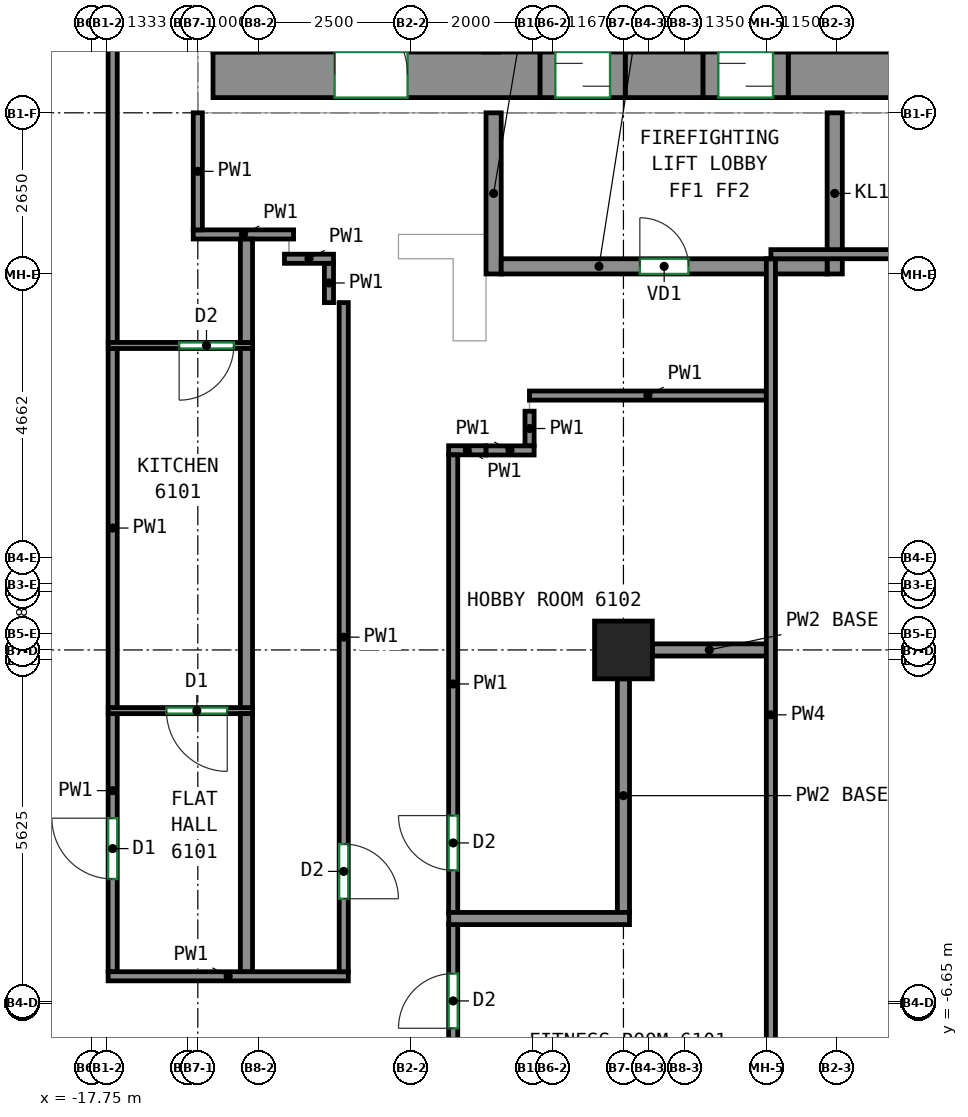
"""IFC4 building model, lengths in metres.
Left out: names, types, materials, properties, quantities, classifications, styles, units other than length and angle.
Written with IfcOpenShell. Run it as: python <this file> out.ifc"""

import sys

from ifc_helpers import new_model, si_unit, direction, frame, frame_2d, origin, origin_2d, place, context, subcontext, project, spatial, rectangle, extrude, source, transform, mapped, element, fill, save


model = new_model("IFC4")
c1 = context("Model", 3, precision=1e-05, world=origin(), true_north=direction((0.0, 1.0)))
c2 = subcontext(c1, "Body", "Model", "MODEL_VIEW")
j1 = project(units=[si_unit("LENGTHUNIT", "METRE"), si_unit("PLANEANGLEUNIT", "RADIAN")], contexts=[c1])
p1 = place(None, origin())
s1 = spatial("IfcSite", under=j1, at=p1, CompositionType="ELEMENT")
p2 = place(p1, origin())
s2 = spatial("IfcBuilding", under=s1, at=p2, CompositionType="ELEMENT")
p3 = place(p2, frame((0.0, 0.0, 252.6)))
s3 = spatial("IfcBuildingStorey", under=s2, at=p3, CompositionType="ELEMENT", Elevation=252.6)
m1 = source(origin(), c2, "Body", "SweptSolid", [
    extrude(rectangle(XDim=0.95, YDim=0.95, at=origin_2d()), origin(), (0.0, 0.0, 1.0), 3.12),
])
p4 = place(p3, frame((-9.0, -0.833, 0.0), z_axis=(0.0, 0.0, 1.0), x_axis=(1.0, 0.0, 0.0)))
e1 = element("IfcColumn", 1, at=p4, inside=s3, PredefinedType="COLUMN", context=c2, shape_type="MappedRepresentation", body=[
    mapped(m1, transform((0.0, 0.0, 0.0))),
])
m2 = source(origin(), c2, "Body", "SweptSolid", [
    extrude(rectangle(XDim=5.38, YDim=0.75, at=frame_2d((2.69, 0.0))), origin(), (0.0, 0.0, 1.0), 3.12),
])
p5 = place(p3, frame((-15.75, 8.625, 0.0), z_axis=(0.0, 0.0, 1.0), x_axis=(1.0, 0.0, 0.0)))
e2 = element("IfcWall", 2, at=p5, inside=s3, PredefinedType="SHEAR", context=c2, shape_type="MappedRepresentation", body=[
    mapped(m2, transform((0.0, 0.0, 0.0))),
])
p6 = place(p5, frame((2.0, 0.0, 0.0)))
e3 = element("IfcOpeningElement", 3, at=p6, cuts=e2, PredefinedType="OPENING", context=c2, shape_type="SweptSolid", body=[
    extrude(rectangle(XDim=1.2, YDim=2.1, at=frame_2d((0.6, 1.05))), frame((0.0, 0.385, 0.0), z_axis=(0.0, -1.0, 0.0), x_axis=(1.0, 0.0, 0.0)), (0.0, 0.0, 1.0), 0.77),
])
m3 = source(origin(), c2, "Body", "SweptSolid", [
    extrude(rectangle(XDim=1.28, YDim=0.75, at=frame_2d((0.64, 0.0))), origin(), (0.0, 0.0, 1.0), 3.12),
])
p7 = place(p3, frame((-8.97, 8.625, 0.0), z_axis=(0.0, 0.0, 1.0), x_axis=(1.0, 0.0, 0.0)))
e4 = element("IfcWall", 4, at=p7, inside=s3, PredefinedType="SHEAR", context=c2, shape_type="MappedRepresentation", body=[
    mapped(m3, transform((0.0, 0.0, 0.0))),
])
m4 = source(origin(), c2, "Body", "SweptSolid", [
    extrude(rectangle(XDim=14.18, YDim=0.75, at=frame_2d((7.09, 0.0))), origin(), (0.0, 0.0, 1.0), 3.12),
])
p8 = place(p3, frame((-6.29, 8.625, 0.0), z_axis=(0.0, 0.0, 1.0), x_axis=(1.0, 0.0, 0.0)))
e5 = element("IfcWall", 5, at=p8, inside=s3, PredefinedType="SHEAR", context=c2, shape_type="MappedRepresentation", body=[
    mapped(m4, transform((0.0, 0.0, 0.0))),
])
m5 = source(origin(), c2, "Body", "SweptSolid", [
    extrude(rectangle(XDim=2.65, YDim=0.25, at=frame_2d((1.325, 0.0))), origin(), (0.0, 0.0, 1.0), 2.57),
])
for number, where, z_axis, x_axis in (
    (6, (-11.135, 5.35, 0.0), (0.0, 0.0, 1.0), (0.0, 1.0, 0.0)),
    (7, (-5.525, 5.35, 0.0), (0.0, 0.0, 1.0), (0.0, 1.0, 0.0)),
):
    element("IfcWall", number, at=place(p3, frame(where, z_axis=z_axis, x_axis=x_axis)), inside=s3, PredefinedType="PARTITIONING", context=c2, shape_type="MappedRepresentation", body=[
        mapped(m5, transform((0.0, 0.0, 0.0))),
    ])
m6 = source(origin(), c2, "Body", "SweptSolid", [
    extrude(rectangle(XDim=5.36, YDim=0.25, at=frame_2d((2.68, 0.0))), origin(), (0.0, 0.0, 1.0), 3.12),
])
p9 = place(p3, frame((-11.01, 5.475, 0.0), z_axis=(0.0, 0.0, 1.0), x_axis=(1.0, 0.0, 0.0)))
e8 = element("IfcWall", 8, at=p9, inside=s3, PredefinedType="PARTITIONING", context=c2, shape_type="MappedRepresentation", body=[
    mapped(m6, transform((0.0, 0.0, 0.0))),
])
p10 = place(p9, frame((2.28, 0.0, 0.0)))
e9 = element("IfcOpeningElement", 9, at=p10, cuts=e8, PredefinedType="OPENING", context=c2, shape_type="SweptSolid", body=[
    extrude(rectangle(XDim=0.8, YDim=2.0, at=frame_2d((0.4, 1.0))), frame((0.0, 0.135, 0.0), z_axis=(0.0, -1.0, 0.0), x_axis=(1.0, 0.0, 0.0)), (0.0, 0.0, 1.0), 0.27),
])
m7 = source(origin(), c2, "Body", "SweptSolid", [
    extrude(rectangle(XDim=1.4, YDim=0.75, at=frame_2d((0.7, 0.0))), origin(), (0.0, 0.0, 1.0), 2.7),
])
p11 = place(p3, frame((-10.37, 8.625, 0.0), z_axis=(0.0, 0.0, 1.0), x_axis=(1.0, 0.0, 0.0)))
e10 = element("IfcWall", 10, at=p11, inside=s3, PredefinedType="PARTITIONING", context=c2, shape_type="MappedRepresentation", body=[
    mapped(m7, transform((0.0, 0.0, 0.0))),
])
p12 = place(p11, frame((0.25, 0.0, 0.0)))
e11 = element("IfcOpeningElement", 11, at=p12, cuts=e10, PredefinedType="OPENING", context=c2, shape_type="SweptSolid", body=[
    extrude(rectangle(XDim=0.9, YDim=2.1, at=frame_2d((0.45, 1.05))), frame((0.0, 0.385, 0.0), z_axis=(0.0, -1.0, 0.0), x_axis=(1.0, 0.0, 0.0)), (0.0, 0.0, 1.0), 0.77),
])
m8 = source(origin(), c2, "Body", "SweptSolid", [
    extrude(rectangle(XDim=1.4, YDim=0.75, at=frame_2d((0.7, 0.0))), origin(), (0.0, 0.0, 1.0), 2.7),
])
p13 = place(p3, frame((-7.69, 8.625, 0.0), z_axis=(0.0, 0.0, 1.0), x_axis=(1.0, 0.0, 0.0)))
e12 = element("IfcWall", 12, at=p13, inside=s3, PredefinedType="PARTITIONING", context=c2, shape_type="MappedRepresentation", body=[
    mapped(m8, transform((0.0, 0.0, 0.0))),
])
p14 = place(p13, frame((0.25, 0.0, 0.0)))
e13 = element("IfcOpeningElement", 13, at=p14, cuts=e12, PredefinedType="OPENING", context=c2, shape_type="SweptSolid", body=[
    extrude(rectangle(XDim=0.9, YDim=2.1, at=frame_2d((0.45, 1.05))), frame((0.0, 0.385, 0.0), z_axis=(0.0, -1.0, 0.0), x_axis=(1.0, 0.0, 0.0)), (0.0, 0.0, 1.0), 0.77),
])
p15 = place(p3, frame((-17.4, -6.125, 0.0), z_axis=(0.0, 0.0, 1.0), x_axis=(0.0, 1.0, 0.0)))
e14 = element("IfcWall", 14, at=p15, inside=s3, PredefinedType="PARTITIONING", context=c2, shape_type="SweptSolid", body=[
    extrude(rectangle(XDim=4.254, YDim=0.15, at=frame_2d((2.127, 0.0))), origin(), (0.0, 0.0, 1.0), 3.12),
])
p16 = place(p15, frame((1.525, 0.0, 0.0)))
e15 = element("IfcOpeningElement", 15, at=p16, cuts=e14, PredefinedType="OPENING", context=c2, shape_type="SweptSolid", body=[
    extrude(rectangle(XDim=1.0, YDim=2.1, at=frame_2d((0.5, 1.05))), frame((0.0, 0.085, 0.0), z_axis=(0.0, -1.0, 0.0), x_axis=(1.0, 0.0, 0.0)), (0.0, 0.0, 1.0), 0.17),
])
p17 = place(p3, frame((-17.475, -6.2, 0.0), z_axis=(0.0, 0.0, 1.0), x_axis=(1.0, 0.0, 0.0)))
e16 = element("IfcWall", 16, at=p17, inside=s3, PredefinedType="PARTITIONING", context=c2, shape_type="SweptSolid", body=[
    extrude(rectangle(XDim=3.95, YDim=0.15, at=frame_2d((1.975, 0.0))), origin(), (0.0, 0.0, 1.0), 3.12),
])
p18 = place(p3, frame((-17.4, -1.791, 0.0), z_axis=(0.0, 0.0, 1.0), x_axis=(0.0, 1.0, 0.0)))
e17 = element("IfcWall", 17, at=p18, inside=s3, PredefinedType="PARTITIONING", context=c2, shape_type="SweptSolid", body=[
    extrude(rectangle(XDim=5.925, YDim=0.15, at=frame_2d((2.962, 0.0))), origin(), (0.0, 0.0, 1.0), 3.12),
])
p19 = place(p3, frame((-17.4, 4.214, 0.0), z_axis=(0.0, 0.0, 1.0), x_axis=(0.0, 1.0, 0.0)))
e18 = element("IfcWall", 18, at=p19, inside=s3, PredefinedType="PARTITIONING", context=c2, shape_type="SweptSolid", body=[
    extrude(rectangle(XDim=12.477, YDim=0.15, at=frame_2d((6.238, 0.0))), origin(), (0.0, 0.0, 1.0), 3.12),
])
p20 = place(p3, frame((-16.075, 6.0, 0.0), z_axis=(0.0, 0.0, 1.0), x_axis=(1.0, 0.0, 0.0)))
e19 = element("IfcWall", 19, at=p20, inside=s3, PredefinedType="PARTITIONING", context=c2, shape_type="SweptSolid", body=[
    extrude(rectangle(XDim=1.65, YDim=0.15, at=frame_2d((0.825, 0.0))), origin(), (0.0, 0.0, 1.0), 3.12),
])
p21 = place(p3, frame((-16.0, 6.075, 0.0), z_axis=(0.0, 0.0, 1.0), x_axis=(0.0, 1.0, 0.0)))
e20 = element("IfcWall", 20, at=p21, inside=s3, PredefinedType="PARTITIONING", context=c2, shape_type="SweptSolid", body=[
    extrude(rectangle(XDim=1.925, YDim=0.15, at=frame_2d((0.962, 0.0))), origin(), (0.0, 0.0, 1.0), 3.12),
])
p22 = place(p3, frame((-13.6, 4.879, 0.0), z_axis=(0.0, 0.0, 1.0), x_axis=(0.0, -1.0, 0.0)))
e21 = element("IfcWall", 21, at=p22, inside=s3, PredefinedType="PARTITIONING", context=c2, shape_type="SweptSolid", body=[
    extrude(rectangle(XDim=11.004, YDim=0.15, at=frame_2d((5.502, 0.0))), origin(), (0.0, 0.0, 1.0), 3.12),
])
p23 = place(p22, frame((8.904, 0.0, 0.0)))
e22 = element("IfcOpeningElement", 22, at=p23, cuts=e21, PredefinedType="OPENING", context=c2, shape_type="SweptSolid", body=[
    extrude(rectangle(XDim=0.9, YDim=2.1, at=frame_2d((0.45, 1.05))), frame((0.0, 0.085, 0.0), z_axis=(0.0, -1.0, 0.0), x_axis=(1.0, 0.0, 0.0)), (0.0, 0.0, 1.0), 0.17),
])
p24 = place(p3, frame((-13.843, 5.525, 0.0), z_axis=(0.0, 0.0, 1.0), x_axis=(0.0, -1.0, 0.0)))
e23 = element("IfcWall", 23, at=p24, inside=s3, PredefinedType="PARTITIONING", context=c2, shape_type="SweptSolid", body=[
    extrude(rectangle(XDim=0.646, YDim=0.15, at=frame_2d((0.323, 0.0))), origin(), (0.0, 0.0, 1.0), 3.12),
])
p25 = place(p3, frame((-14.575, 5.6, 0.0), z_axis=(0.0, 0.0, 1.0), x_axis=(1.0, 0.0, 0.0)))
e24 = element("IfcWall", 24, at=p25, inside=s3, PredefinedType="PARTITIONING", context=c2, shape_type="SweptSolid", body=[
    extrude(rectangle(XDim=0.807, YDim=0.15, at=frame_2d((0.403, 0.0))), origin(), (0.0, 0.0, 1.0), 3.12),
])
p26 = place(p3, frame((-10.546, 3.35, 0.0), z_axis=(0.0, 0.0, 1.0), x_axis=(1.0, 0.0, 0.0)))
e25 = element("IfcWall", 25, at=p26, inside=s3, PredefinedType="PARTITIONING", context=c2, shape_type="SweptSolid", body=[
    extrude(rectangle(XDim=3.896, YDim=0.15, at=frame_2d((1.948, 0.0))), origin(), (0.0, 0.0, 1.0), 3.12),
])
p27 = place(p3, frame((-10.544, 2.523, 0.0), z_axis=(0.0, 0.0, 1.0), x_axis=(0.0, 1.0, 0.0)))
e26 = element("IfcWall", 26, at=p27, inside=s3, PredefinedType="PARTITIONING", context=c2, shape_type="SweptSolid", body=[
    extrude(rectangle(XDim=0.57, YDim=0.15, at=frame_2d((0.285, 0.0))), origin(), (0.0, 0.0, 1.0), 3.12),
])
p28 = place(p3, frame((-11.262, 2.448, 0.0), z_axis=(0.0, 0.0, 1.0), x_axis=(1.0, 0.0, 0.0)))
e27 = element("IfcWall", 27, at=p28, inside=s3, PredefinedType="PARTITIONING", context=c2, shape_type="SweptSolid", body=[
    extrude(rectangle(XDim=0.793, YDim=0.15, at=frame_2d((0.396, 0.0))), origin(), (0.0, 0.0, 1.0), 3.12),
])
p29 = place(p3, frame((-11.875, 2.45, 0.0), z_axis=(0.0, 0.0, 1.0), x_axis=(1.0, 0.0, 0.0)))
e28 = element("IfcWall", 28, at=p29, inside=s3, PredefinedType="PARTITIONING", context=c2, shape_type="SweptSolid", body=[
    extrude(rectangle(XDim=0.613, YDim=0.15, at=frame_2d((0.307, 0.0))), origin(), (0.0, 0.0, 1.0), 3.12),
])
p30 = place(p3, frame((-11.8, -5.16, 0.0), z_axis=(0.0, 0.0, 1.0), x_axis=(0.0, 1.0, 0.0)))
e29 = element("IfcWall", 29, at=p30, inside=s3, PredefinedType="PARTITIONING", context=c2, shape_type="SweptSolid", body=[
    extrude(rectangle(XDim=7.535, YDim=0.15, at=frame_2d((3.768, 0.0))), origin(), (0.0, 0.0, 1.0), 3.12),
])
p31 = place(p30, frame((0.703, 0.0, 0.0)))
e30 = element("IfcOpeningElement", 30, at=p31, cuts=e29, PredefinedType="OPENING", context=c2, shape_type="SweptSolid", body=[
    extrude(rectangle(XDim=0.9, YDim=2.1, at=frame_2d((0.45, 1.05))), frame((0.0, 0.085, 0.0), z_axis=(0.0, -1.0, 0.0), x_axis=(1.0, 0.0, 0.0)), (0.0, 0.0, 1.0), 0.17),
])
p32 = place(p3, frame((-11.8, -10.125, 0.0), z_axis=(0.0, 0.0, 1.0), x_axis=(0.0, 1.0, 0.0)))
e31 = element("IfcWall", 31, at=p32, inside=s3, PredefinedType="PARTITIONING", context=c2, shape_type="SweptSolid", body=[
    extrude(rectangle(XDim=4.785, YDim=0.15, at=frame_2d((2.393, 0.0))), origin(), (0.0, 0.0, 1.0), 3.12),
])
p33 = place(p32, frame((3.07, 0.0, 0.0)))
e32 = element("IfcOpeningElement", 32, at=p33, cuts=e31, PredefinedType="OPENING", context=c2, shape_type="SweptSolid", body=[
    extrude(rectangle(XDim=0.9, YDim=2.1, at=frame_2d((0.45, 1.05))), frame((0.0, 0.085, 0.0), z_axis=(0.0, -1.0, 0.0), x_axis=(1.0, 0.0, 0.0)), (0.0, 0.0, 1.0), 0.17),
])
p34 = place(p3, frame((-15.1, -1.831, 0.0), z_axis=(0.0, 0.0, 1.0), x_axis=(-1.0, 0.0, 0.0)))
e33 = element("IfcWall", 33, at=p34, inside=s3, PredefinedType="PARTITIONING", context=c2, shape_type="SweptSolid", body=[
    extrude(rectangle(XDim=2.373, YDim=0.1, at=frame_2d((1.187, 0.0))), origin(), (0.0, 0.0, 1.0), 3.12),
])
p35 = place(p34, frame((0.416, 0.0, 0.0)))
e34 = element("IfcOpeningElement", 34, at=p35, cuts=e33, PredefinedType="OPENING", context=c2, shape_type="SweptSolid", body=[
    extrude(rectangle(XDim=1.0, YDim=2.1, at=frame_2d((0.5, 1.05))), frame((0.0, 0.06, 0.0), z_axis=(0.0, -1.0, 0.0), x_axis=(1.0, 0.0, 0.0)), (0.0, 0.0, 1.0), 0.12),
])
p36 = place(p3, frame((-15.2, -6.123, 0.0), z_axis=(0.0, 0.0, 1.0), x_axis=(0.0, 1.0, 0.0)))
e35 = element("IfcWall", 35, at=p36, inside=s3, PredefinedType="PARTITIONING", context=c2, shape_type="SweptSolid", body=[
    extrude(rectangle(XDim=4.242, YDim=0.2, at=frame_2d((2.121, 0.0))), origin(), (0.0, 0.0, 1.0), 3.12),
])
p37 = place(p3, frame((-15.1, 4.174, 0.0), z_axis=(0.0, 0.0, 1.0), x_axis=(-1.0, 0.0, 0.0)))
e36 = element("IfcWall", 36, at=p37, inside=s3, PredefinedType="PARTITIONING", context=c2, shape_type="SweptSolid", body=[
    extrude(rectangle(XDim=2.373, YDim=0.1, at=frame_2d((1.187, 0.0))), origin(), (0.0, 0.0, 1.0), 3.12),
])
p38 = place(p37, frame((0.307, 0.0, 0.0)))
e37 = element("IfcOpeningElement", 37, at=p38, cuts=e36, PredefinedType="OPENING", context=c2, shape_type="SweptSolid", body=[
    extrude(rectangle(XDim=0.9, YDim=2.1, at=frame_2d((0.45, 1.05))), frame((0.0, 0.06, 0.0), z_axis=(0.0, -1.0, 0.0), x_axis=(1.0, 0.0, 0.0)), (0.0, 0.0, 1.0), 0.12),
])
p39 = place(p3, frame((-15.2, -1.781, 0.0), z_axis=(0.0, 0.0, 1.0), x_axis=(0.0, 1.0, 0.0)))
e38 = element("IfcWall", 38, at=p39, inside=s3, PredefinedType="PARTITIONING", context=c2, shape_type="SweptSolid", body=[
    extrude(rectangle(XDim=5.905, YDim=0.2, at=frame_2d((2.953, 0.0))), origin(), (0.0, 0.0, 1.0), 3.12),
])
p40 = place(p3, frame((-15.2, 4.224, 0.0), z_axis=(0.0, 0.0, 1.0), x_axis=(0.0, 1.0, 0.0)))
e39 = element("IfcWall", 39, at=p40, inside=s3, PredefinedType="PARTITIONING", context=c2, shape_type="SweptSolid", body=[
    extrude(rectangle(XDim=1.699, YDim=0.2, at=frame_2d((0.85, 0.0))), origin(), (0.0, 0.0, 1.0), 3.12),
])
p41 = place(p3, frame((-8.525, -0.833, 0.0), z_axis=(0.0, 0.0, 1.0), x_axis=(1.0, 0.0, 0.0)))
e40 = element("IfcWall", 40, at=p41, inside=s3, PredefinedType="PARTITIONING", context=c2, shape_type="SweptSolid", body=[
    extrude(rectangle(XDim=1.875, YDim=0.2, at=frame_2d((0.938, 0.0))), origin(), (0.0, 0.0, 1.0), 2.57),
])
p42 = place(p3, frame((-9.0, -5.15, 0.0), z_axis=(0.0, 0.0, 1.0), x_axis=(0.0, 1.0, 0.0)))
e41 = element("IfcWall", 41, at=p42, inside=s3, PredefinedType="PARTITIONING", context=c2, shape_type="SweptSolid", body=[
    extrude(rectangle(XDim=3.842, YDim=0.2, at=frame_2d((1.921, 0.0))), origin(), (0.0, 0.0, 1.0), 2.57),
])
p43 = place(p3, frame((-11.873, -5.25, 0.0), z_axis=(0.0, 0.0, 1.0), x_axis=(1.0, 0.0, 0.0)))
e42 = element("IfcWall", 42, at=p43, inside=s3, PredefinedType="PARTITIONING", context=c2, shape_type="SweptSolid", body=[
    extrude(rectangle(XDim=2.973, YDim=0.2, at=frame_2d((1.487, 0.0))), origin(), (0.0, 0.0, 1.0), 3.12),
])
p44 = place(p3, frame((-6.575, -9.4, 0.0), z_axis=(0.0, 0.0, 1.0), x_axis=(0.0, 1.0, 0.0)))
e43 = element("IfcWall", 43, at=p44, inside=s3, PredefinedType="PARTITIONING", context=c2, shape_type="SweptSolid", body=[
    extrude(rectangle(XDim=15.0, YDim=0.15, at=frame_2d((7.5, 0.0))), origin(), (0.0, 0.0, 1.0), 3.12),
])
p45 = place(p3, frame((-6.575, 5.675, 0.0), z_axis=(0.0, 0.0, 1.0), x_axis=(1.0, 0.0, 0.0)))
e44 = element("IfcWall", 44, at=p45, inside=s3, PredefinedType="PARTITIONING", context=c2, shape_type="SweptSolid", body=[
    extrude(rectangle(XDim=15.075, YDim=0.15, at=frame_2d((7.538, 0.0))), origin(), (0.0, 0.0, 1.0), 3.12),
])
p46 = place(p10, origin())
e45 = element("IfcDoor", 45, at=p46, inside=s3, OperationType="SINGLE_SWING_LEFT", PredefinedType="DOOR", context=c2, shape_type="SweptSolid", body=[
    extrude(rectangle(XDim=0.8, YDim=2.0, at=frame_2d((0.4, 1.0))), frame((0.0, 0.025, 0.0), z_axis=(0.0, -1.0, 0.0), x_axis=(1.0, 0.0, 0.0)), (0.0, 0.0, 1.0), 0.05),
])
fill(e9, e45)
p47 = place(p12, origin())
e46 = element("IfcDoor", 46, at=p47, inside=s3, OperationType="SLIDING_TO_LEFT", PredefinedType="DOOR", context=c2, shape_type="SweptSolid", body=[
    extrude(rectangle(XDim=0.9, YDim=2.1, at=frame_2d((0.45, 1.05))), frame((0.0, 0.28, 0.0), z_axis=(0.0, -1.0, 0.0), x_axis=(1.0, 0.0, 0.0)), (0.0, 0.0, 1.0), 0.05),
])
fill(e11, e46)
p48 = place(p14, origin())
e47 = element("IfcDoor", 47, at=p48, inside=s3, OperationType="SLIDING_TO_RIGHT", PredefinedType="DOOR", context=c2, shape_type="SweptSolid", body=[
    extrude(rectangle(XDim=0.9, YDim=2.1, at=frame_2d((0.45, 1.05))), frame((0.0, 0.28, 0.0), z_axis=(0.0, -1.0, 0.0), x_axis=(1.0, 0.0, 0.0)), (0.0, 0.0, 1.0), 0.05),
])
fill(e13, e47)
p49 = place(p6, origin())
e48 = element("IfcDoor", 48, at=p49, inside=s3, OperationType="DOUBLE_DOOR_SINGLE_SWING", PredefinedType="DOOR", context=c2, shape_type="SweptSolid", body=[
    extrude(rectangle(XDim=1.2, YDim=2.1, at=frame_2d((0.6, 1.05))), frame((0.0, 0.28, 0.0), z_axis=(0.0, -1.0, 0.0), x_axis=(1.0, 0.0, 0.0)), (0.0, 0.0, 1.0), 0.05),
])
fill(e3, e48)
p50 = place(p33, origin())
e49 = element("IfcDoor", 49, at=p50, inside=s3, OperationType="SINGLE_SWING_LEFT", PredefinedType="DOOR", context=c2, shape_type="SweptSolid", body=[
    extrude(rectangle(XDim=0.9, YDim=2.1, at=frame_2d((0.45, 1.05))), frame((0.0, 0.025, 0.0), z_axis=(0.0, -1.0, 0.0), x_axis=(1.0, 0.0, 0.0)), (0.0, 0.0, 1.0), 0.05),
])
fill(e32, e49)
p51 = place(p23, origin())
e50 = element("IfcDoor", 50, at=p51, inside=s3, OperationType="SINGLE_SWING_RIGHT", PredefinedType="DOOR", context=c2, shape_type="SweptSolid", body=[
    extrude(rectangle(XDim=0.9, YDim=2.1, at=frame_2d((0.45, 1.05))), frame((0.0, 0.025, 0.0), z_axis=(0.0, -1.0, 0.0), x_axis=(1.0, 0.0, 0.0)), (0.0, 0.0, 1.0), 0.05),
])
fill(e22, e50)
p52 = place(p16, origin())
e51 = element("IfcDoor", 51, at=p52, inside=s3, OperationType="SINGLE_SWING_RIGHT", PredefinedType="DOOR", context=c2, shape_type="SweptSolid", body=[
    extrude(rectangle(XDim=1.0, YDim=2.1, at=frame_2d((0.5, 1.05))), frame((0.0, 0.025, 0.0), z_axis=(0.0, -1.0, 0.0), x_axis=(1.0, 0.0, 0.0)), (0.0, 0.0, 1.0), 0.05),
])
fill(e15, e51)
p53 = place(p31, origin())
e52 = element("IfcDoor", 52, at=p53, inside=s3, OperationType="SINGLE_SWING_RIGHT", PredefinedType="DOOR", context=c2, shape_type="SweptSolid", body=[
    extrude(rectangle(XDim=0.9, YDim=2.1, at=frame_2d((0.45, 1.05))), frame((0.0, 0.025, 0.0), z_axis=(0.0, -1.0, 0.0), x_axis=(1.0, 0.0, 0.0)), (0.0, 0.0, 1.0), 0.05),
])
fill(e30, e52)
p54 = place(p35, origin())
e53 = element("IfcDoor", 53, at=p54, inside=s3, OperationType="SINGLE_SWING_LEFT", PredefinedType="DOOR", context=c2, shape_type="SweptSolid", body=[
    extrude(rectangle(XDim=1.0, YDim=2.1, at=frame_2d((0.5, 1.05))), frame((0.0, 0.025, 0.0), z_axis=(0.0, -1.0, 0.0), x_axis=(1.0, 0.0, 0.0)), (0.0, 0.0, 1.0), 0.05),
])
fill(e34, e53)
p55 = place(p38, origin())
e54 = element("IfcDoor", 54, at=p55, inside=s3, OperationType="SINGLE_SWING_RIGHT", PredefinedType="DOOR", context=c2, shape_type="SweptSolid", body=[
    extrude(rectangle(XDim=0.9, YDim=2.1, at=frame_2d((0.45, 1.05))), frame((0.0, 0.025, 0.0), z_axis=(0.0, -1.0, 0.0), x_axis=(1.0, 0.0, 0.0)), (0.0, 0.0, 1.0), 0.05),
])
fill(e37, e54)
save(model, sys.argv[1])
